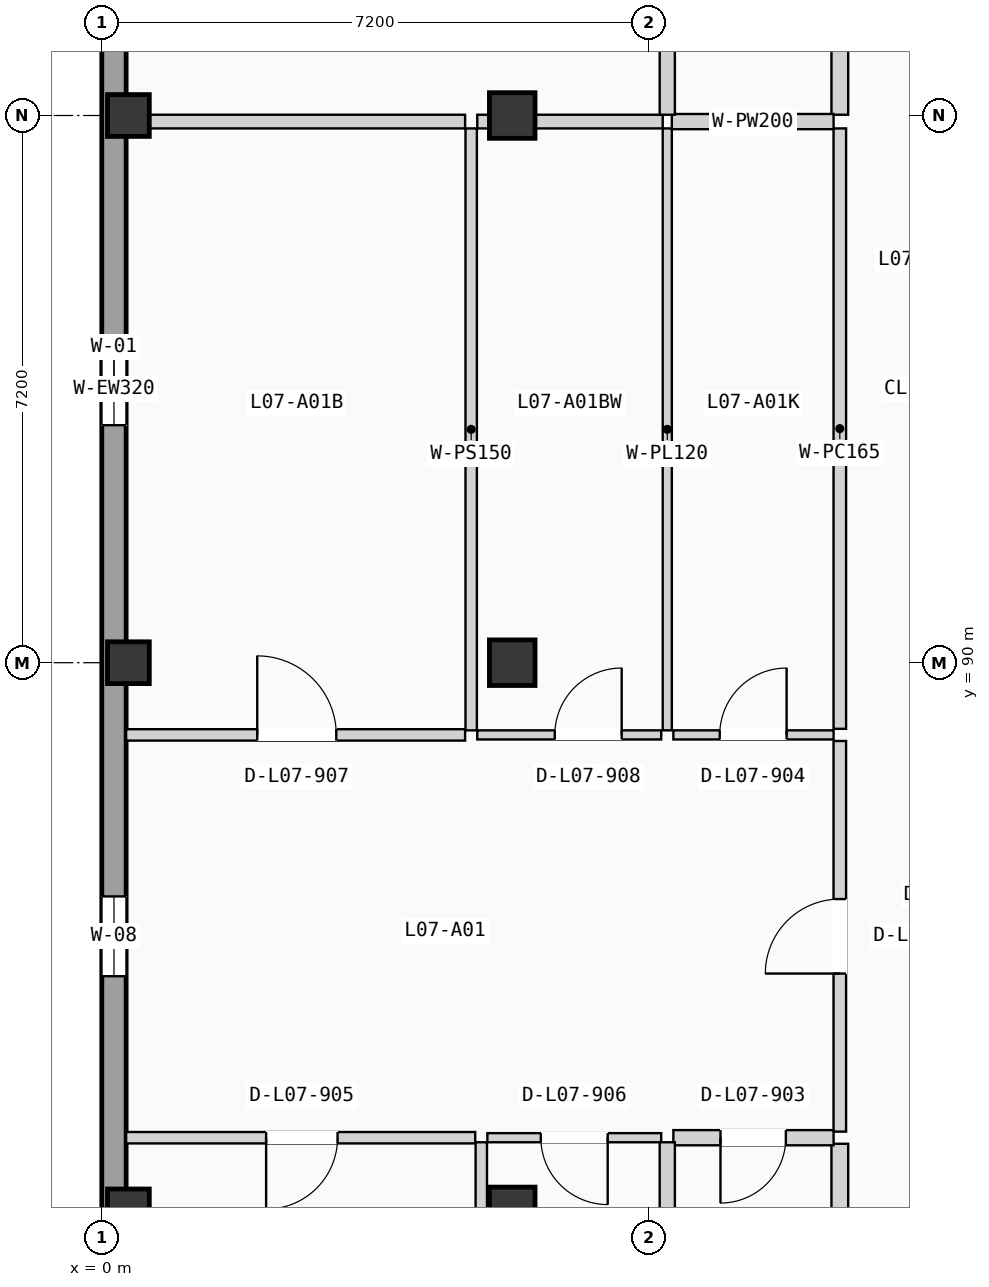
"""IFC4 building model, lengths in metres.
Left out: names, types, materials, properties, quantities, classifications, styles, units other than length and angle.
Written with IfcOpenShell. Run it as: python <this file> out.ifc"""

import sys

from ifc_helpers import new_model, si_unit, direction, frame, frame_2d, origin, origin_2d, place, context, subcontext, project, spatial, rectangle, extrude, element, fill, save


model = new_model("IFC4")
c1 = context("Model", 3, precision=1e-05, world=origin(), true_north=direction((0.0, 1.0)))
c2 = subcontext(c1, "Body", "Model", "MODEL_VIEW")
j1 = project(units=[si_unit("LENGTHUNIT", "METRE"), si_unit("PLANEANGLEUNIT", "RADIAN")], contexts=[c1])
p1 = place(None, origin())
s1 = spatial("IfcSite", under=j1, at=p1, CompositionType="ELEMENT")
p2 = place(p1, origin())
s2 = spatial("IfcBuilding", under=s1, at=p2, CompositionType="ELEMENT")
p3 = place(p2, frame((0.0, 0.0, 24.675)))
s3 = spatial("IfcBuildingStorey", under=s2, at=p3, CompositionType="ELEMENT", Elevation=24.675)
for number, where, z_axis, x_axis in (
    (1, (0.35, 82.8, 0.0), (0.0, 0.0, 1.0), (1.0, 0.0, 0.0)),
    (2, (0.35, 90.0, 0.0), (0.0, 0.0, 1.0), (1.0, 0.0, 0.0)),
    (3, (0.35, 97.2, 0.0), (0.0, 0.0, 1.0), (1.0, 0.0, 0.0)),
):
    element("IfcColumn", number, at=place(p3, frame(where, z_axis=z_axis, x_axis=x_axis)), inside=s3, PredefinedType="COLUMN", context=c2, shape_type="SweptSolid", body=[
        extrude(rectangle(XDim=0.55, YDim=0.55, at=origin_2d()), origin(), (0.0, 0.0, 1.0), 3.15),
    ])
for number, where, z_axis, x_axis in (
    (4, (5.4, 82.8, 0.0), (0.0, 0.0, 1.0), (1.0, 0.0, 0.0)),
    (5, (5.4, 90.0, 0.0), (0.0, 0.0, 1.0), (1.0, 0.0, 0.0)),
    (6, (5.4, 97.2, 0.0), (0.0, 0.0, 1.0), (1.0, 0.0, 0.0)),
):
    element("IfcColumn", number, at=place(p3, frame(where, z_axis=z_axis, x_axis=x_axis)), inside=s3, PredefinedType="COLUMN", context=c2, shape_type="SweptSolid", body=[
        extrude(rectangle(XDim=0.6, YDim=0.6, at=origin_2d()), origin(), (0.0, 0.0, 1.0), 3.15),
    ])
p4 = place(p3, frame((0.16, 68.72, 0.0), z_axis=(0.0, 0.0, 1.0), x_axis=(0.0, 1.0, 0.0)))
e7 = element("IfcWall", 7, at=p4, inside=s3, PredefinedType="SOLIDWALL", context=c2, shape_type="SweptSolid", body=[
    extrude(rectangle(XDim=49.76, YDim=0.32, at=frame_2d((24.88, 0.0))), origin(), (0.0, 0.0, 1.0), 2.9),
])
p5 = place(p4, frame((17.155, 0.0, 0.715)))
e8 = element("IfcOpeningElement", 8, at=p5, cuts=e7, PredefinedType="OPENING", context=c2, shape_type="SweptSolid", body=[
    extrude(rectangle(XDim=1.05, YDim=1.5, at=frame_2d((0.525, 0.75))), frame((0.0, 0.17, 0.0), z_axis=(0.0, -1.0, 0.0), x_axis=(1.0, 0.0, 0.0)), (0.0, 0.0, 1.0), 0.34),
])
p6 = place(p4, frame((10.02, 0.0, 0.565)))
e9 = element("IfcOpeningElement", 9, at=p6, cuts=e7, PredefinedType="OPENING", context=c2, shape_type="SweptSolid", body=[
    extrude(rectangle(XDim=1.05, YDim=1.65, at=frame_2d((0.525, 0.825))), frame((0.0, 0.17, 0.0), z_axis=(0.0, -1.0, 0.0), x_axis=(1.0, 0.0, 0.0)), (0.0, 0.0, 1.0), 0.34),
])
p7 = place(p4, frame((24.405, 0.0, 0.85)))
e10 = element("IfcOpeningElement", 10, at=p7, cuts=e7, PredefinedType="OPENING", context=c2, shape_type="SweptSolid", body=[
    extrude(rectangle(XDim=0.95, YDim=1.2, at=frame_2d((0.475, 0.6))), frame((0.0, 0.17, 0.0), z_axis=(0.0, -1.0, 0.0), x_axis=(1.0, 0.0, 0.0)), (0.0, 0.0, 1.0), 0.34),
])
p8 = place(p4, frame((33.584, 0.0, 0.9)))
e11 = element("IfcOpeningElement", 11, at=p8, cuts=e7, PredefinedType="OPENING", context=c2, shape_type="SweptSolid", body=[
    extrude(rectangle(XDim=1.15, YDim=1.2, at=frame_2d((0.575, 0.6))), frame((0.0, 0.17, 0.0), z_axis=(0.0, -1.0, 0.0), x_axis=(1.0, 0.0, 0.0)), (0.0, 0.0, 1.0), 0.34),
])
p9 = place(p4, frame((30.174, 0.0, 0.865)))
e12 = element("IfcOpeningElement", 12, at=p9, cuts=e7, PredefinedType="OPENING", context=c2, shape_type="SweptSolid", body=[
    extrude(rectangle(XDim=1.15, YDim=1.35, at=frame_2d((0.575, 0.675))), frame((0.0, 0.17, 0.0), z_axis=(0.0, -1.0, 0.0), x_axis=(1.0, 0.0, 0.0)), (0.0, 0.0, 1.0), 0.34),
])
p10 = place(p4, frame((39.776, 0.0, 0.715)))
e13 = element("IfcOpeningElement", 13, at=p10, cuts=e7, PredefinedType="OPENING", context=c2, shape_type="SweptSolid", body=[
    extrude(rectangle(XDim=1.15, YDim=1.5, at=frame_2d((0.575, 0.75))), frame((0.0, 0.17, 0.0), z_axis=(0.0, -1.0, 0.0), x_axis=(1.0, 0.0, 0.0)), (0.0, 0.0, 1.0), 0.34),
])
p11 = place(p3, frame((9.71, 83.83, 0.0), z_axis=(0.0, 0.0, 1.0), x_axis=(0.0, 1.0, 0.0)))
e14 = element("IfcWall", 14, at=p11, inside=s3, PredefinedType="PARTITIONING", context=c2, shape_type="SweptSolid", body=[
    extrude(rectangle(XDim=5.14, YDim=0.165, at=frame_2d((2.57, 0.0))), origin(), (0.0, 0.0, 1.0), 2.87),
])
p12 = place(p11, frame((2.08, 0.0, 0.0)))
e15 = element("IfcOpeningElement", 15, at=p12, cuts=e14, PredefinedType="OPENING", context=c2, shape_type="SweptSolid", body=[
    extrude(rectangle(XDim=0.98, YDim=2.08, at=frame_2d((0.49, 1.04))), frame((0.0, 0.093, 0.0), z_axis=(0.0, -1.0, 0.0), x_axis=(1.0, 0.0, 0.0)), (0.0, 0.0, 1.0), 0.185),
])
p13 = place(p3, frame((9.71, 76.0, 0.0), z_axis=(0.0, 0.0, 1.0), x_axis=(0.0, 1.0, 0.0)))
e16 = element("IfcWall", 16, at=p13, inside=s3, PredefinedType="PLUMBINGWALL", context=c2, shape_type="SweptSolid", body=[
    extrude(rectangle(XDim=7.67, YDim=0.22, at=frame_2d((3.835, 0.0))), origin(), (0.0, 0.0, 1.0), 2.87),
])
p14 = place(p3, frame((9.71, 89.13, 0.0), z_axis=(0.0, 0.0, 1.0), x_axis=(0.0, 1.0, 0.0)))
e17 = element("IfcWall", 17, at=p14, inside=s3, PredefinedType="PARTITIONING", context=c2, shape_type="SweptSolid", body=[
    extrude(rectangle(XDim=7.9, YDim=0.165, at=frame_2d((3.95, 0.0))), origin(), (0.0, 0.0, 1.0), 2.87),
])
p15 = place(p3, frame((9.71, 97.21, 0.0), z_axis=(0.0, 0.0, 1.0), x_axis=(0.0, 1.0, 0.0)))
e18 = element("IfcWall", 18, at=p15, inside=s3, PredefinedType="PLUMBINGWALL", context=c2, shape_type="SweptSolid", body=[
    extrude(rectangle(XDim=4.257, YDim=0.22, at=frame_2d((2.128, 0.0))), origin(), (0.0, 0.0, 1.0), 2.87),
])
p16 = place(p3, frame((7.52, 83.75, 0.0), z_axis=(0.0, 0.0, 1.0), x_axis=(1.0, 0.0, 0.0)))
e19 = element("IfcWall", 19, at=p16, inside=s3, PredefinedType="PLUMBINGWALL", context=c2, shape_type="SweptSolid", body=[
    extrude(rectangle(XDim=2.108, YDim=0.2, at=frame_2d((1.054, 0.0))), origin(), (0.0, 0.0, 1.0), 2.87),
])
p17 = place(p16, frame((0.62, 0.0, 0.0)))
e20 = element("IfcOpeningElement", 20, at=p17, cuts=e19, PredefinedType="OPENING", context=c2, shape_type="SweptSolid", body=[
    extrude(rectangle(XDim=0.86, YDim=2.0, at=frame_2d((0.43, 1.0))), frame((0.0, 0.11, 0.0), z_axis=(0.0, -1.0, 0.0), x_axis=(1.0, 0.0, 0.0)), (0.0, 0.0, 1.0), 0.22),
])
p18 = place(p3, frame((7.52, 89.05, 0.0), z_axis=(0.0, 0.0, 1.0), x_axis=(1.0, 0.0, 0.0)))
e21 = element("IfcWall", 21, at=p18, inside=s3, PredefinedType="PARTITIONING", context=c2, shape_type="SweptSolid", body=[
    extrude(rectangle(XDim=2.108, YDim=0.12, at=frame_2d((1.054, 0.0))), origin(), (0.0, 0.0, 1.0), 2.87),
])
p19 = place(p18, frame((0.61, 0.0, 0.0)))
e22 = element("IfcOpeningElement", 22, at=p19, cuts=e21, PredefinedType="OPENING", context=c2, shape_type="SweptSolid", body=[
    extrude(rectangle(XDim=0.88, YDim=2.02, at=frame_2d((0.44, 1.01))), frame((0.0, 0.07, 0.0), z_axis=(0.0, -1.0, 0.0), x_axis=(1.0, 0.0, 0.0)), (0.0, 0.0, 1.0), 0.14),
])
p20 = place(p3, frame((0.32, 83.75, 0.0), z_axis=(0.0, 0.0, 1.0), x_axis=(1.0, 0.0, 0.0)))
e23 = element("IfcWall", 23, at=p20, inside=s3, PredefinedType="PARTITIONING", context=c2, shape_type="SweptSolid", body=[
    extrude(rectangle(XDim=4.593, YDim=0.15, at=frame_2d((2.296, 0.0))), origin(), (0.0, 0.0, 1.0), 2.87),
])
p21 = place(p20, frame((1.842, 0.0, 0.0)))
e24 = element("IfcOpeningElement", 24, at=p21, cuts=e23, PredefinedType="OPENING", context=c2, shape_type="SweptSolid", body=[
    extrude(rectangle(XDim=0.94, YDim=2.06, at=frame_2d((0.47, 1.03))), frame((0.0, 0.085, 0.0), z_axis=(0.0, -1.0, 0.0), x_axis=(1.0, 0.0, 0.0)), (0.0, 0.0, 1.0), 0.17),
])
p22 = place(p3, frame((5.073, 83.75, 0.0), z_axis=(0.0, 0.0, 1.0), x_axis=(1.0, 0.0, 0.0)))
e25 = element("IfcWall", 25, at=p22, inside=s3, PredefinedType="PARTITIONING", context=c2, shape_type="SweptSolid", body=[
    extrude(rectangle(XDim=2.287, YDim=0.12, at=frame_2d((1.144, 0.0))), origin(), (0.0, 0.0, 1.0), 2.87),
])
p23 = place(p22, frame((0.703, 0.0, 0.0)))
e26 = element("IfcOpeningElement", 26, at=p23, cuts=e25, PredefinedType="OPENING", context=c2, shape_type="SweptSolid", body=[
    extrude(rectangle(XDim=0.88, YDim=2.02, at=frame_2d((0.44, 1.01))), frame((0.0, 0.07, 0.0), z_axis=(0.0, -1.0, 0.0), x_axis=(1.0, 0.0, 0.0)), (0.0, 0.0, 1.0), 0.14),
])
p24 = place(p3, frame((0.32, 89.05, 0.0), z_axis=(0.0, 0.0, 1.0), x_axis=(1.0, 0.0, 0.0)))
e27 = element("IfcWall", 27, at=p24, inside=s3, PredefinedType="PARTITIONING", context=c2, shape_type="SweptSolid", body=[
    extrude(rectangle(XDim=4.46, YDim=0.15, at=frame_2d((2.23, 0.0))), origin(), (0.0, 0.0, 1.0), 2.87),
])
p25 = place(p24, frame((1.725, 0.0, 0.0)))
e28 = element("IfcOpeningElement", 28, at=p25, cuts=e27, PredefinedType="OPENING", context=c2, shape_type="SweptSolid", body=[
    extrude(rectangle(XDim=1.04, YDim=2.08, at=frame_2d((0.52, 1.04))), frame((0.0, 0.085, 0.0), z_axis=(0.0, -1.0, 0.0), x_axis=(1.0, 0.0, 0.0)), (0.0, 0.0, 1.0), 0.17),
])
p26 = place(p3, frame((4.94, 89.05, 0.0), z_axis=(0.0, 0.0, 1.0), x_axis=(1.0, 0.0, 0.0)))
e29 = element("IfcWall", 29, at=p26, inside=s3, PredefinedType="PARTITIONING", context=c2, shape_type="SweptSolid", body=[
    extrude(rectangle(XDim=2.42, YDim=0.12, at=frame_2d((1.21, 0.0))), origin(), (0.0, 0.0, 1.0), 2.87),
])
p27 = place(p26, frame((1.02, 0.0, 0.0)))
e30 = element("IfcOpeningElement", 30, at=p27, cuts=e29, PredefinedType="OPENING", context=c2, shape_type="SweptSolid", body=[
    extrude(rectangle(XDim=0.88, YDim=2.02, at=frame_2d((0.44, 1.01))), frame((0.0, 0.07, 0.0), z_axis=(0.0, -1.0, 0.0), x_axis=(1.0, 0.0, 0.0)), (0.0, 0.0, 1.0), 0.14),
])
p28 = place(p3, frame((7.44, 76.0, 0.0), z_axis=(0.0, 0.0, 1.0), x_axis=(0.0, 1.0, 0.0)))
e31 = element("IfcWall", 31, at=p28, inside=s3, PredefinedType="PLUMBINGWALL", context=c2, shape_type="SweptSolid", body=[
    extrude(rectangle(XDim=7.69, YDim=0.2, at=frame_2d((3.845, 0.0))), origin(), (0.0, 0.0, 1.0), 2.87),
])
p29 = place(p28, frame((3.41, 0.0, 0.0)))
e32 = element("IfcOpeningElement", 32, at=p29, cuts=e31, PredefinedType="OPENING", context=c2, shape_type="SweptSolid", body=[
    extrude(rectangle(XDim=0.85, YDim=2.01, at=frame_2d((0.425, 1.005))), frame((0.0, 0.11, 0.0), z_axis=(0.0, -1.0, 0.0), x_axis=(1.0, 0.0, 0.0)), (0.0, 0.0, 1.0), 0.22),
])
p30 = place(p3, frame((7.44, 89.11, 0.0), z_axis=(0.0, 0.0, 1.0), x_axis=(0.0, 1.0, 0.0)))
e33 = element("IfcWall", 33, at=p30, inside=s3, PredefinedType="PARTITIONING", context=c2, shape_type="SweptSolid", body=[
    extrude(rectangle(XDim=7.92, YDim=0.12, at=frame_2d((3.96, 0.0))), origin(), (0.0, 0.0, 1.0), 2.87),
])
p31 = place(p3, frame((7.5, 97.12, 0.0), z_axis=(0.0, 0.0, 1.0), x_axis=(1.0, 0.0, 0.0)))
e34 = element("IfcWall", 34, at=p31, inside=s3, PredefinedType="PLUMBINGWALL", context=c2, shape_type="SweptSolid", body=[
    extrude(rectangle(XDim=2.128, YDim=0.2, at=frame_2d((1.064, 0.0))), origin(), (0.0, 0.0, 1.0), 2.17),
])
p32 = place(p3, frame((4.993, 76.0, 0.0), z_axis=(0.0, 0.0, 1.0), x_axis=(0.0, 1.0, 0.0)))
e35 = element("IfcWall", 35, at=p32, inside=s3, PredefinedType="PARTITIONING", context=c2, shape_type="SweptSolid", body=[
    extrude(rectangle(XDim=7.69, YDim=0.15, at=frame_2d((3.845, 0.0))), origin(), (0.0, 0.0, 1.0), 2.87),
])
p33 = place(p3, frame((4.86, 89.11, 0.0), z_axis=(0.0, 0.0, 1.0), x_axis=(0.0, 1.0, 0.0)))
e36 = element("IfcWall", 36, at=p33, inside=s3, PredefinedType="PARTITIONING", context=c2, shape_type="SweptSolid", body=[
    extrude(rectangle(XDim=7.92, YDim=0.15, at=frame_2d((3.96, 0.0))), origin(), (0.0, 0.0, 1.0), 2.87),
])
p34 = place(p3, frame((0.32, 97.12, 0.0), z_axis=(0.0, 0.0, 1.0), x_axis=(1.0, 0.0, 0.0)))
e37 = element("IfcWall", 37, at=p34, inside=s3, PredefinedType="PARTITIONING", context=c2, shape_type="SweptSolid", body=[
    extrude(rectangle(XDim=4.46, YDim=0.18, at=frame_2d((2.23, 0.0))), origin(), (0.0, 0.0, 1.0), 2.22),
])
p35 = place(p3, frame((4.94, 97.12, 0.0), z_axis=(0.0, 0.0, 1.0), x_axis=(1.0, 0.0, 0.0)))
e38 = element("IfcWall", 38, at=p35, inside=s3, PredefinedType="PARTITIONING", context=c2, shape_type="SweptSolid", body=[
    extrude(rectangle(XDim=2.44, YDim=0.18, at=frame_2d((1.22, 0.0))), origin(), (0.0, 0.0, 1.0), 2.17),
])
p36 = place(p3, frame((7.44, 97.21, 0.0), z_axis=(0.0, 0.0, 1.0), x_axis=(0.0, 1.0, 0.0)))
e39 = element("IfcWall", 39, at=p36, inside=s3, PredefinedType="PLUMBINGWALL", context=c2, shape_type="SweptSolid", body=[
    extrude(rectangle(XDim=4.257, YDim=0.2, at=frame_2d((2.128, 0.0))), origin(), (0.0, 0.0, 1.0), 2.87),
])
p37 = place(p5, origin())
e40 = element("IfcWindow", 40, at=p37, inside=s3, PartitioningType="SINGLE_PANEL", PredefinedType="WINDOW", context=c2, shape_type="SweptSolid", body=[
    extrude(rectangle(XDim=1.05, YDim=1.5, at=frame_2d((0.525, 0.75))), frame((0.0, 0.03, 0.0), z_axis=(0.0, -1.0, 0.0), x_axis=(1.0, 0.0, 0.0)), (0.0, 0.0, 1.0), 0.06),
])
fill(e8, e40)
p38 = place(p7, origin())
e41 = element("IfcWindow", 41, at=p38, inside=s3, PartitioningType="SINGLE_PANEL", PredefinedType="WINDOW", context=c2, shape_type="SweptSolid", body=[
    extrude(rectangle(XDim=0.95, YDim=1.2, at=frame_2d((0.475, 0.6))), frame((0.0, 0.03, 0.0), z_axis=(0.0, -1.0, 0.0), x_axis=(1.0, 0.0, 0.0)), (0.0, 0.0, 1.0), 0.06),
])
fill(e10, e41)
p39 = place(p12, origin())
e42 = element("IfcDoor", 42, at=p39, inside=s3, OperationType="SINGLE_SWING_LEFT", PredefinedType="DOOR", context=c2, shape_type="SweptSolid", body=[
    extrude(rectangle(XDim=0.98, YDim=2.08, at=frame_2d((0.49, 1.04))), frame((0.0, 0.025, 0.0), z_axis=(0.0, -1.0, 0.0), x_axis=(1.0, 0.0, 0.0)), (0.0, 0.0, 1.0), 0.05),
])
fill(e15, e42)
p40 = place(p17, frame((0.86, 0.0, 0.0), z_axis=(0.0, 0.0, 1.0), x_axis=(-1.0, 0.0, 0.0)))
e43 = element("IfcDoor", 43, at=p40, inside=s3, OperationType="SINGLE_SWING_LEFT", PredefinedType="DOOR", context=c2, shape_type="SweptSolid", body=[
    extrude(rectangle(XDim=0.86, YDim=2.0, at=frame_2d((0.43, 1.0))), frame((0.0, 0.025, 0.0), z_axis=(0.0, -1.0, 0.0), x_axis=(1.0, 0.0, 0.0)), (0.0, 0.0, 1.0), 0.05),
])
fill(e20, e43)
p41 = place(p19, origin())
e44 = element("IfcDoor", 44, at=p41, inside=s3, OperationType="SINGLE_SWING_RIGHT", PredefinedType="DOOR", context=c2, shape_type="SweptSolid", body=[
    extrude(rectangle(XDim=0.88, YDim=2.02, at=frame_2d((0.44, 1.01))), frame((0.0, 0.025, 0.0), z_axis=(0.0, -1.0, 0.0), x_axis=(1.0, 0.0, 0.0)), (0.0, 0.0, 1.0), 0.05),
])
fill(e22, e44)
p42 = place(p21, frame((0.94, 0.0, 0.0), z_axis=(0.0, 0.0, 1.0), x_axis=(-1.0, 0.0, 0.0)))
e45 = element("IfcDoor", 45, at=p42, inside=s3, OperationType="SINGLE_SWING_LEFT", PredefinedType="DOOR", context=c2, shape_type="SweptSolid", body=[
    extrude(rectangle(XDim=0.94, YDim=2.06, at=frame_2d((0.47, 1.03))), frame((0.0, 0.025, 0.0), z_axis=(0.0, -1.0, 0.0), x_axis=(1.0, 0.0, 0.0)), (0.0, 0.0, 1.0), 0.05),
])
fill(e24, e45)
p43 = place(p23, frame((0.88, 0.0, 0.0), z_axis=(0.0, 0.0, 1.0), x_axis=(-1.0, 0.0, 0.0)))
e46 = element("IfcDoor", 46, at=p43, inside=s3, OperationType="SINGLE_SWING_RIGHT", PredefinedType="DOOR", context=c2, shape_type="SweptSolid", body=[
    extrude(rectangle(XDim=0.88, YDim=2.02, at=frame_2d((0.44, 1.01))), frame((0.0, 0.025, 0.0), z_axis=(0.0, -1.0, 0.0), x_axis=(1.0, 0.0, 0.0)), (0.0, 0.0, 1.0), 0.05),
])
fill(e26, e46)
p44 = place(p25, origin())
e47 = element("IfcDoor", 47, at=p44, inside=s3, OperationType="SINGLE_SWING_LEFT", PredefinedType="DOOR", context=c2, shape_type="SweptSolid", body=[
    extrude(rectangle(XDim=1.04, YDim=2.08, at=frame_2d((0.52, 1.04))), frame((0.0, 0.025, 0.0), z_axis=(0.0, -1.0, 0.0), x_axis=(1.0, 0.0, 0.0)), (0.0, 0.0, 1.0), 0.05),
])
fill(e28, e47)
p45 = place(p27, origin())
e48 = element("IfcDoor", 48, at=p45, inside=s3, OperationType="SINGLE_SWING_RIGHT", PredefinedType="DOOR", context=c2, shape_type="SweptSolid", body=[
    extrude(rectangle(XDim=0.88, YDim=2.02, at=frame_2d((0.44, 1.01))), frame((0.0, 0.025, 0.0), z_axis=(0.0, -1.0, 0.0), x_axis=(1.0, 0.0, 0.0)), (0.0, 0.0, 1.0), 0.05),
])
fill(e30, e48)
save(model, sys.argv[1])
